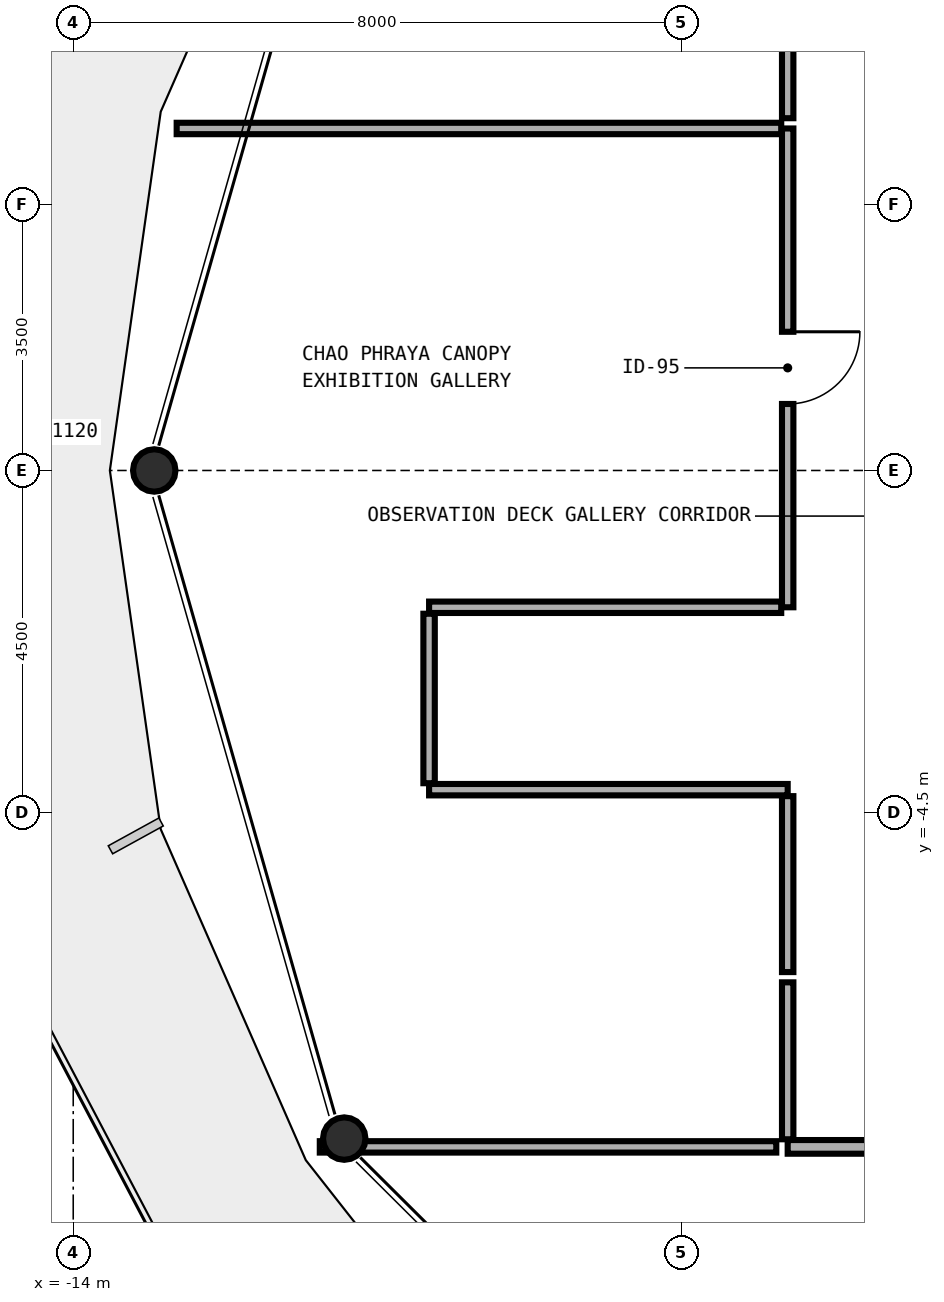
"""IFC4 building model, lengths in metres.
Left out: names, types, materials, properties, quantities, classifications, styles, units other than length and angle.
Written with IfcOpenShell. Run it as: python <this file> out.ifc"""

import sys

from ifc_helpers import new_model, si_unit, direction, frame, frame_2d, origin, origin_2d, place, context, subcontext, project, spatial, rectangle, hollow_circle, extrude, element, fill, save


model = new_model("IFC4")
c1 = context("Model", 3, precision=1e-05, world=origin(), true_north=direction((0.0, 1.0)))
c2 = subcontext(c1, "Body", "Model", "MODEL_VIEW")
j1 = project(units=[si_unit("LENGTHUNIT", "METRE"), si_unit("PLANEANGLEUNIT", "RADIAN")], contexts=[c1])
p1 = place(None, origin())
s1 = spatial("IfcSite", under=j1, at=p1, CompositionType="ELEMENT")
p2 = place(p1, origin())
s2 = spatial("IfcBuilding", under=s1, at=p2, CompositionType="ELEMENT")
p3 = place(p2, frame((0.0, 0.0, 285.0)))
s3 = spatial("IfcBuildingStorey", under=s2, at=p3, CompositionType="ELEMENT", Elevation=285.0)
for number, where, z_axis, x_axis in (
    (1, (-12.968, 0.0, 0.0), (0.015, 0.0, 1.0), (0.0, 1.0, 0.0)),
    (2, (-10.464, -8.8, 0.0), (0.013, 0.004, 1.0), (-0.279, 0.96, 0.0)),
):
    element("IfcColumn", number, at=place(p3, frame(where, z_axis=z_axis, x_axis=x_axis)), inside=s3, PredefinedType="COLUMN", context=c2, shape_type="SweptSolid", body=[
        extrude(hollow_circle(Radius=0.28, WallThickness=0.02, at=origin_2d()), origin(), (0.0, 0.0, 1.0), 4.476),
    ])
p4 = place(p3, frame((-4.6, 4.5, 0.0), z_axis=(0.0, 0.0, 1.0), x_axis=(0.0, -1.0, 0.0)))
e3 = element("IfcWall", 3, at=p4, inside=s3, PredefinedType="PARTITIONING", context=c2, shape_type="SweptSolid", body=[
    extrude(rectangle(XDim=6.3, YDim=0.15, at=frame_2d((3.15, 0.0))), origin(), (0.0, 0.0, 1.0), 4.08),
])
p5 = place(p4, frame((2.675, 0.0, 0.0)))
e4 = element("IfcOpeningElement", 4, at=p5, cuts=e3, PredefinedType="OPENING", context=c2, shape_type="SweptSolid", body=[
    extrude(rectangle(XDim=0.95, YDim=2.1, at=frame_2d((0.475, 1.05))), frame((0.0, 0.085, 0.0), z_axis=(0.0, -1.0, 0.0), x_axis=(1.0, 0.0, 0.0)), (0.0, 0.0, 1.0), 0.17),
])
p6 = place(p3, frame((-4.6, -8.9, 0.0), z_axis=(0.0, 0.0, 1.0), x_axis=(1.0, 0.0, 0.0)))
e5 = element("IfcWall", 5, at=p6, inside=s3, PredefinedType="PLUMBINGWALL", context=c2, shape_type="SweptSolid", body=[
    extrude(rectangle(XDim=2.45, YDim=0.18, at=frame_2d((1.225, 0.0))), origin(), (0.0, 0.0, 1.0), 4.08),
])
p7 = place(p3, frame((-10.756, -8.9, 0.0), z_axis=(0.0, 0.0, 1.0), x_axis=(1.0, 0.0, 0.0)))
e6 = element("IfcWall", 6, at=p7, inside=s3, PredefinedType="PARTITIONING", context=c2, shape_type="SweptSolid", body=[
    extrude(rectangle(XDim=6.006, YDim=0.15, at=frame_2d((3.003, 0.0))), origin(), (0.0, 0.0, 1.0), 3.612),
])
p8 = place(p3, frame((-4.685, -1.8, 0.0), z_axis=(0.0, 0.0, 1.0), x_axis=(-1.0, 0.0, 0.0)))
e7 = element("IfcWall", 7, at=p8, inside=s3, PredefinedType="PARTITIONING", context=c2, shape_type="SweptSolid", body=[
    extrude(rectangle(XDim=4.633, YDim=0.15, at=frame_2d((2.316, 0.0))), origin(), (0.0, 0.0, 1.0), 4.08),
])
p9 = place(p3, frame((-9.318, -4.2, 0.0), z_axis=(0.0, 0.0, 1.0), x_axis=(1.0, 0.0, 0.0)))
e8 = element("IfcWall", 8, at=p9, inside=s3, PredefinedType="PARTITIONING", context=c2, shape_type="SweptSolid", body=[
    extrude(rectangle(XDim=4.718, YDim=0.15, at=frame_2d((2.359, 0.0))), origin(), (0.0, 0.0, 1.0), 4.08),
])
p10 = place(p3, frame((-9.318, -1.885, 0.0), z_axis=(0.0, 0.0, 1.0), x_axis=(0.0, -1.0, 0.0)))
e9 = element("IfcWall", 9, at=p10, inside=s3, PredefinedType="PARTITIONING", context=c2, shape_type="SweptSolid", body=[
    extrude(rectangle(XDim=2.23, YDim=0.15, at=frame_2d((1.115, 0.0))), origin(), (0.0, 0.0, 1.0), 4.08),
])
p11 = place(p3, frame((-4.6, -4.285, 0.0), z_axis=(0.0, 0.0, 1.0), x_axis=(0.0, -1.0, 0.0)))
e10 = element("IfcWall", 10, at=p11, inside=s3, PredefinedType="PARTITIONING", context=c2, shape_type="SweptSolid", body=[
    extrude(rectangle(XDim=2.315, YDim=0.15, at=frame_2d((1.158, 0.0))), origin(), (0.0, 0.0, 1.0), 4.08),
])
p12 = place(p3, frame((-4.6, -6.735, 0.0), z_axis=(0.0, 0.0, 1.0), x_axis=(0.0, -1.0, 0.0)))
e11 = element("IfcWall", 11, at=p12, inside=s3, PredefinedType="PARTITIONING", context=c2, shape_type="SweptSolid", body=[
    extrude(rectangle(XDim=2.065, YDim=0.15, at=frame_2d((1.032, 0.0))), origin(), (0.0, 0.0, 1.0), 4.08),
])
p13 = place(p3, frame((-12.639, 4.5, 0.0), z_axis=(0.0, 0.0, 1.0), x_axis=(1.0, 0.0, 0.0)))
e12 = element("IfcWall", 12, at=p13, inside=s3, PredefinedType="PARTITIONING", context=c2, shape_type="SweptSolid", body=[
    extrude(rectangle(XDim=7.954, YDim=0.15, at=frame_2d((3.977, 0.0))), origin(), (0.0, 0.0, 1.0), 4.08),
])
p14 = place(p3, frame((-4.6, 5.915, 0.0), z_axis=(0.0, 0.0, 1.0), x_axis=(0.0, -1.0, 0.0)))
e13 = element("IfcWall", 13, at=p14, inside=s3, PredefinedType="PARTITIONING", context=c2, shape_type="SweptSolid", body=[
    extrude(rectangle(XDim=1.28, YDim=0.15, at=frame_2d((0.64, 0.0))), origin(), (0.0, 0.0, 1.0), 4.08),
])
p15 = place(p5, origin())
e14 = element("IfcDoor", 14, at=p15, inside=s3, OperationType="SINGLE_SWING_LEFT", PredefinedType="DOOR", context=c2, shape_type="SweptSolid", body=[
    extrude(rectangle(XDim=0.95, YDim=2.1, at=frame_2d((0.475, 1.05))), frame((0.0, 0.025, 0.0), z_axis=(0.0, -1.0, 0.0), x_axis=(1.0, 0.0, 0.0)), (0.0, 0.0, 1.0), 0.05),
])
fill(e4, e14)
save(model, sys.argv[1])
